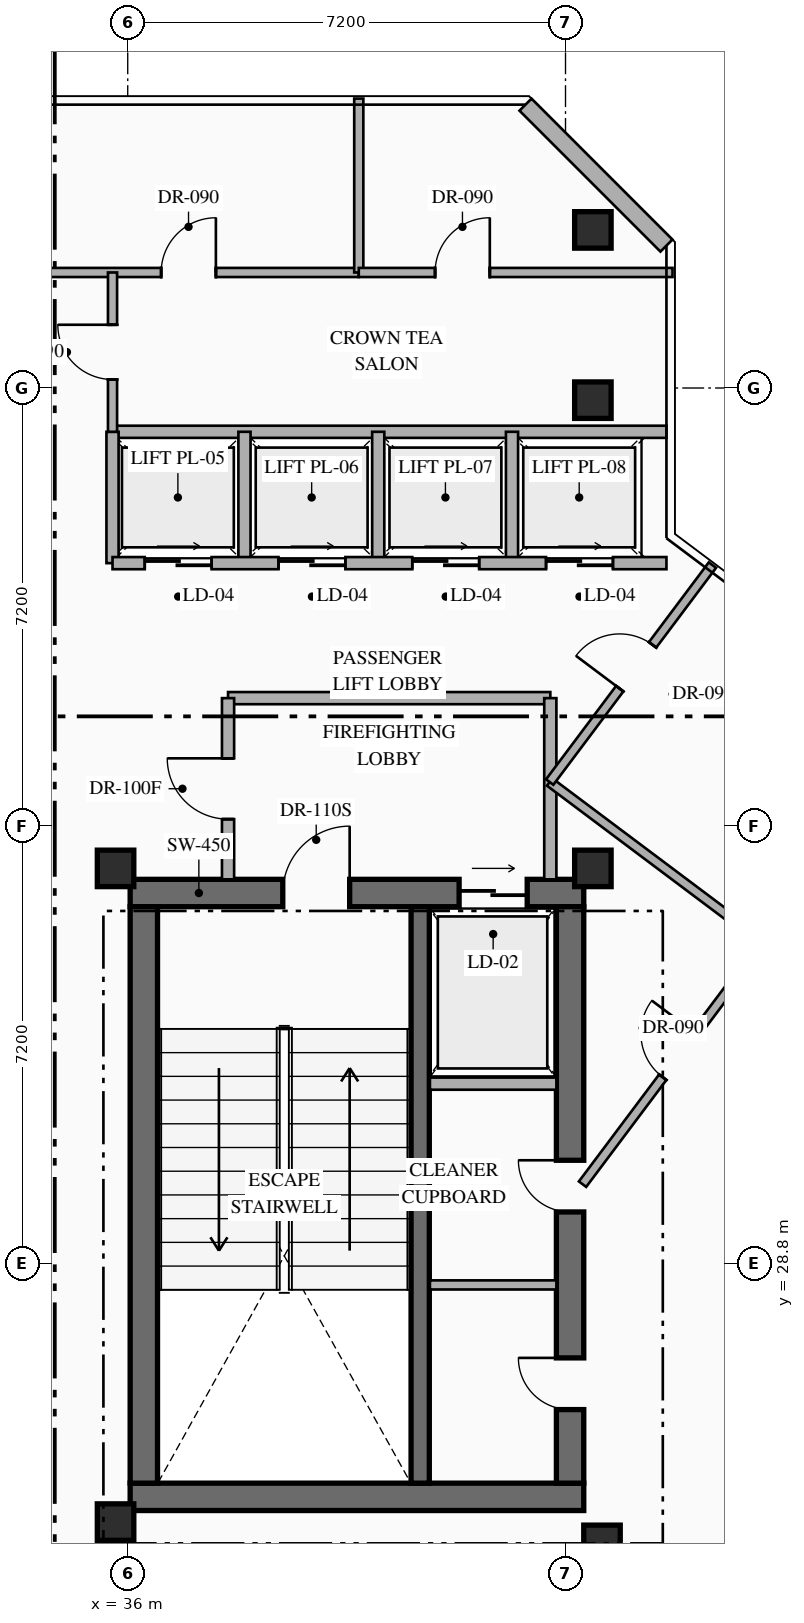
"""IFC4 building model, lengths in metres.
Left out: names, types, materials, properties, quantities, classifications, styles, units other than length and angle.
Written with IfcOpenShell. Run it as: python <this file> out.ifc"""

import sys

from ifc_helpers import new_model, si_unit, direction, frame, frame_2d, origin, origin_2d, place, context, subcontext, project, spatial, rectangle, hollow_rectangle, extrude, element, fill, save


model = new_model("IFC4")
c1 = context("Model", 3, precision=1e-05, world=origin(), true_north=direction((0.0, 1.0)))
c2 = subcontext(c1, "Body", "Model", "MODEL_VIEW")
j1 = project(units=[si_unit("LENGTHUNIT", "METRE"), si_unit("PLANEANGLEUNIT", "RADIAN")], contexts=[c1])
p1 = place(None, origin())
s1 = spatial("IfcSite", under=j1, at=p1, CompositionType="ELEMENT")
p2 = place(p1, origin())
s2 = spatial("IfcBuilding", under=s1, at=p2, CompositionType="ELEMENT")
p3 = place(p2, frame((0.0, 0.0, 269.95)))
s3 = spatial("IfcBuildingStorey", under=s2, at=p3, CompositionType="ELEMENT", Elevation=269.95)
p4 = place(p3, frame((36.04, 24.965, 0.0), z_axis=(0.0, 0.0, 1.0), x_axis=(1.0, 0.0, 0.0)))
e1 = element("IfcWall", 1, at=p4, inside=s3, PredefinedType="SHEAR", context=c2, shape_type="SweptSolid", body=[
    extrude(rectangle(XDim=7.46, YDim=0.45, at=frame_2d((3.73, 0.0))), origin(), (0.0, 0.0, 1.0), 4.0),
])
p5 = place(p3, frame((36.04, 34.895, 0.0), z_axis=(0.0, 0.0, 1.0), x_axis=(1.0, 0.0, 0.0)))
e2 = element("IfcWall", 2, at=p5, inside=s3, PredefinedType="SHEAR", context=c2, shape_type="SweptSolid", body=[
    extrude(rectangle(XDim=7.46, YDim=0.45, at=frame_2d((3.73, 0.0))), origin(), (0.0, 0.0, 1.0), 4.0),
])
p6 = place(p5, frame((2.51, 0.0, 0.0)))
e3 = element("IfcOpeningElement", 3, at=p6, cuts=e2, PredefinedType="OPENING", context=c2, shape_type="SweptSolid", body=[
    extrude(rectangle(XDim=1.1, YDim=2.2, at=frame_2d((0.55, 1.1))), frame((0.0, 0.235, 0.0), z_axis=(0.0, -1.0, 0.0), x_axis=(1.0, 0.0, 0.0)), (0.0, 0.0, 1.0), 0.47),
])
p7 = place(p5, frame((5.41, 0.0, 0.0)))
e4 = element("IfcOpeningElement", 4, at=p7, cuts=e2, PredefinedType="OPENING", context=c2, shape_type="SweptSolid", body=[
    extrude(rectangle(XDim=1.12, YDim=2.15, at=frame_2d((0.56, 1.075))), frame((0.0, 0.235, 0.0), z_axis=(0.0, -1.0, 0.0), x_axis=(1.0, 0.0, 0.0)), (0.0, 0.0, 1.0), 0.47),
])
p8 = place(p3, frame((36.265, 25.19, 0.0), z_axis=(0.0, 0.0, 1.0), x_axis=(0.0, 1.0, 0.0)))
e5 = element("IfcWall", 5, at=p8, inside=s3, PredefinedType="SHEAR", context=c2, shape_type="SweptSolid", body=[
    extrude(rectangle(XDim=9.48, YDim=0.45, at=frame_2d((4.74, 0.0))), origin(), (0.0, 0.0, 1.0), 4.0),
])
p9 = place(p3, frame((43.275, 25.19, 0.0), z_axis=(0.0, 0.0, 1.0), x_axis=(0.0, 1.0, 0.0)))
e6 = element("IfcWall", 6, at=p9, inside=s3, PredefinedType="SHEAR", context=c2, shape_type="SweptSolid", body=[
    extrude(rectangle(XDim=9.48, YDim=0.45, at=frame_2d((4.74, 0.0))), origin(), (0.0, 0.0, 1.0), 4.0),
])
p10 = place(p9, frame((1.21, 0.0, 0.0)))
e7 = element("IfcOpeningElement", 7, at=p10, cuts=e6, PredefinedType="OPENING", context=c2, shape_type="SweptSolid", body=[
    extrude(rectangle(XDim=0.85, YDim=2.08, at=frame_2d((0.425, 1.04))), frame((0.0, 0.235, 0.0), z_axis=(0.0, -1.0, 0.0), x_axis=(1.0, 0.0, 0.0)), (0.0, 0.0, 1.0), 0.47),
])
p11 = place(p9, frame((4.46, 0.0, 0.0)))
e8 = element("IfcOpeningElement", 8, at=p11, cuts=e6, PredefinedType="OPENING", context=c2, shape_type="SweptSolid", body=[
    extrude(rectangle(XDim=0.85, YDim=2.08, at=frame_2d((0.425, 1.04))), frame((0.0, 0.235, 0.0), z_axis=(0.0, -1.0, 0.0), x_axis=(1.0, 0.0, 0.0)), (0.0, 0.0, 1.0), 0.47),
])
p12 = place(p3, frame((40.81, 25.19, 0.0), z_axis=(0.0, 0.0, 1.0), x_axis=(0.0, 1.0, 0.0)))
e9 = element("IfcWall", 9, at=p12, inside=s3, PredefinedType="SHEAR", context=c2, shape_type="SweptSolid", body=[
    extrude(rectangle(XDim=9.48, YDim=0.3, at=frame_2d((4.74, 0.0))), origin(), (0.0, 0.0, 1.0), 4.0),
])
for number, where, z_axis, x_axis in (
    (10, (35.8, 24.55, 0.0), (0.0, 0.0, 1.0), (1.0, 0.0, 0.0)),
    (11, (43.8, 24.2, 0.0), (0.0, 0.0, 1.0), (1.0, 0.0, 0.0)),
    (12, (35.8, 35.3, 0.0), (0.0, 0.0, 1.0), (1.0, 0.0, 0.0)),
    (13, (43.65, 35.3, 0.0), (0.0, 0.0, 1.0), (1.0, 0.0, 0.0)),
    (14, (43.65, 43.0, 0.0), (0.0, 0.0, 1.0), (1.0, 0.0, 0.0)),
    (15, (43.65, 45.8, 0.0), (0.0, 0.0, 1.0), (1.0, 0.0, 0.0)),
):
    element("IfcColumn", number, at=place(p3, frame(where, z_axis=z_axis, x_axis=x_axis)), inside=s3, PredefinedType="COLUMN", context=c2, shape_type="SweptSolid", body=[
        extrude(hollow_rectangle(XDim=0.6, YDim=0.6, WallThickness=0.025, at=origin_2d()), origin(), (0.0, 0.0, 1.0), 4.0),
    ])
p13 = place(p3, frame((42.542, 47.86, 0.0), z_axis=(0.0, 0.0, 1.0), x_axis=(0.707106781187, -0.707106781187, 0.0)))
e16 = element("IfcWall", 16, at=p13, inside=s3, PredefinedType="STANDARD", context=c2, shape_type="SweptSolid", body=[
    extrude(rectangle(XDim=3.278, YDim=0.28, at=frame_2d((1.639, 0.0))), origin(), (0.0, 0.0, 1.0), 3.74),
])
p14 = place(p3, frame((40.97, 31.76, 0.0), z_axis=(0.0, 0.0, 1.0), x_axis=(1.0, 0.0, 0.0)))
e17 = element("IfcWall", 17, at=p14, inside=s3, PredefinedType="STANDARD", context=c2, shape_type="SweptSolid", body=[
    extrude(rectangle(XDim=2.08, YDim=0.2, at=frame_2d((1.04, 0.0))), origin(), (0.0, 0.0, 1.0), 3.74),
])
p15 = place(p3, frame((40.97, 28.45, 0.0), z_axis=(0.0, 0.0, 1.0), x_axis=(1.0, 0.0, 0.0)))
e18 = element("IfcWall", 18, at=p15, inside=s3, PredefinedType="PARTITIONING", context=c2, shape_type="SweptSolid", body=[
    extrude(rectangle(XDim=2.08, YDim=0.15, at=frame_2d((1.04, 0.0))), origin(), (0.0, 0.0, 1.0), 3.74),
])
p16 = place(p3, frame((37.65, 38.1, 0.0), z_axis=(0.0, 0.0, 1.0), x_axis=(1.0, 0.0, 0.0)))
e19 = element("IfcWall", 19, at=p16, inside=s3, PredefinedType="STANDARD", context=c2, shape_type="SweptSolid", body=[
    extrude(rectangle(XDim=5.3, YDim=0.2, at=frame_2d((2.65, 0.0))), origin(), (0.0, 0.0, 1.0), 3.74),
])
p17 = place(p3, frame((42.95, 35.12, 0.0), z_axis=(0.0, 0.0, 1.0), x_axis=(0.0, 1.0, 0.0)))
e20 = element("IfcWall", 20, at=p17, inside=s3, PredefinedType="STANDARD", context=c2, shape_type="SweptSolid", body=[
    extrude(rectangle(XDim=2.98, YDim=0.2, at=frame_2d((1.49, 0.0))), origin(), (0.0, 0.0, 1.0), 3.74),
])
p18 = place(p3, frame((37.65, 35.12, 0.0), z_axis=(0.0, 0.0, 1.0), x_axis=(0.0, 1.0, 0.0)))
e21 = element("IfcWall", 21, at=p18, inside=s3, PredefinedType="STANDARD", context=c2, shape_type="SweptSolid", body=[
    extrude(rectangle(XDim=2.98, YDim=0.2, at=frame_2d((1.49, 0.0))), origin(), (0.0, 0.0, 1.0), 3.74),
])
p19 = place(p18, frame((0.99, 0.0, 0.0)))
e22 = element("IfcOpeningElement", 22, at=p19, cuts=e21, PredefinedType="OPENING", context=c2, shape_type="SweptSolid", body=[
    extrude(rectangle(XDim=1.0, YDim=2.2, at=frame_2d((0.5, 1.1))), frame((0.0, 0.11, 0.0), z_axis=(0.0, -1.0, 0.0), x_axis=(1.0, 0.0, 0.0)), (0.0, 0.0, 1.0), 0.22),
])
p20 = place(p3, frame((35.75, 42.48, 0.0), z_axis=(0.0, 0.0, 1.0), x_axis=(1.0, 0.0, 0.0)))
e23 = element("IfcWall", 23, at=p20, inside=s3, PredefinedType="STANDARD", context=c2, shape_type="SweptSolid", body=[
    extrude(rectangle(XDim=9.11, YDim=0.2, at=frame_2d((4.555, 0.0))), origin(), (0.0, 0.0, 1.0), 3.74),
])
for number, where, z_axis, x_axis in (
    (24, (35.75, 40.32, 0.0), (0.0, 0.0, 1.0), (0.0, 1.0, 0.0)),
    (25, (37.92, 40.32, 0.0), (0.0, 0.0, 1.0), (0.0, 1.0, 0.0)),
    (26, (40.12, 40.32, 0.0), (0.0, 0.0, 1.0), (0.0, 1.0, 0.0)),
    (27, (42.32, 40.32, 0.0), (0.0, 0.0, 1.0), (0.0, 1.0, 0.0)),
):
    element("IfcWall", number, at=place(p3, frame(where, z_axis=z_axis, x_axis=x_axis)), inside=s3, PredefinedType="STANDARD", context=c2, shape_type="SweptSolid", body=[
        extrude(rectangle(XDim=2.16, YDim=0.2, at=frame_2d((1.08, 0.0))), origin(), (0.0, 0.0, 1.0), 3.74),
    ])
p21 = place(p3, frame((35.75, 40.32, 0.0), z_axis=(0.0, 0.0, 1.0), x_axis=(1.0, 0.0, 0.0)))
e28 = element("IfcWall", 28, at=p21, inside=s3, PredefinedType="STANDARD", context=c2, shape_type="SweptSolid", body=[
    extrude(rectangle(XDim=9.11, YDim=0.2, at=frame_2d((4.555, 0.0))), origin(), (0.0, 0.0, 1.0), 3.74),
])
p22 = place(p21, frame((0.53, 0.0, 0.0)))
e29 = element("IfcOpeningElement", 29, at=p22, cuts=e28, PredefinedType="OPENING", context=c2, shape_type="SweptSolid", body=[
    extrude(rectangle(XDim=1.1, YDim=2.18, at=frame_2d((0.55, 1.09))), frame((0.0, 0.11, 0.0), z_axis=(0.0, -1.0, 0.0), x_axis=(1.0, 0.0, 0.0)), (0.0, 0.0, 1.0), 0.22),
])
p23 = place(p21, frame((2.73, 0.0, 0.0)))
e30 = element("IfcOpeningElement", 30, at=p23, cuts=e28, PredefinedType="OPENING", context=c2, shape_type="SweptSolid", body=[
    extrude(rectangle(XDim=1.1, YDim=2.18, at=frame_2d((0.55, 1.09))), frame((0.0, 0.11, 0.0), z_axis=(0.0, -1.0, 0.0), x_axis=(1.0, 0.0, 0.0)), (0.0, 0.0, 1.0), 0.22),
])
p24 = place(p21, frame((4.93, 0.0, 0.0)))
e31 = element("IfcOpeningElement", 31, at=p24, cuts=e28, PredefinedType="OPENING", context=c2, shape_type="SweptSolid", body=[
    extrude(rectangle(XDim=1.1, YDim=2.18, at=frame_2d((0.55, 1.09))), frame((0.0, 0.11, 0.0), z_axis=(0.0, -1.0, 0.0), x_axis=(1.0, 0.0, 0.0)), (0.0, 0.0, 1.0), 0.22),
])
p25 = place(p21, frame((7.13, 0.0, 0.0)))
e32 = element("IfcOpeningElement", 32, at=p25, cuts=e28, PredefinedType="OPENING", context=c2, shape_type="SweptSolid", body=[
    extrude(rectangle(XDim=1.1, YDim=2.18, at=frame_2d((0.55, 1.09))), frame((0.0, 0.11, 0.0), z_axis=(0.0, -1.0, 0.0), x_axis=(1.0, 0.0, 0.0)), (0.0, 0.0, 1.0), 0.22),
])
p26 = place(p3, frame((34.2, 45.1, 0.0), z_axis=(0.0, 0.0, 1.0), x_axis=(1.0, 0.0, 0.0)))
e33 = element("IfcWall", 33, at=p26, inside=s3, PredefinedType="PARTITIONING", context=c2, shape_type="SweptSolid", body=[
    extrude(rectangle(XDim=5.6, YDim=0.15, at=frame_2d((2.8, 0.0))), origin(), (0.0, 0.0, 1.0), 3.74),
])
p27 = place(p26, frame((2.35, 0.0, 0.0)))
e34 = element("IfcOpeningElement", 34, at=p27, cuts=e33, PredefinedType="OPENING", context=c2, shape_type="SweptSolid", body=[
    extrude(rectangle(XDim=0.9, YDim=2.15, at=frame_2d((0.45, 1.075))), frame((0.0, 0.085, 0.0), z_axis=(0.0, -1.0, 0.0), x_axis=(1.0, 0.0, 0.0)), (0.0, 0.0, 1.0), 0.17),
])
p28 = place(p3, frame((39.8, 45.1, 0.0), z_axis=(0.0, 0.0, 1.0), x_axis=(0.0, 1.0, 0.0)))
e35 = element("IfcWall", 35, at=p28, inside=s3, PredefinedType="PARTITIONING", context=c2, shape_type="SweptSolid", body=[
    extrude(rectangle(XDim=2.86, YDim=0.15, at=frame_2d((1.43, 0.0))), origin(), (0.0, 0.0, 1.0), 3.74),
])
p29 = place(p3, frame((39.8, 45.1, 0.0), z_axis=(0.0, 0.0, 1.0), x_axis=(1.0, 0.0, 0.0)))
e36 = element("IfcWall", 36, at=p29, inside=s3, PredefinedType="PARTITIONING", context=c2, shape_type="SweptSolid", body=[
    extrude(rectangle(XDim=5.16, YDim=0.15, at=frame_2d((2.58, 0.0))), origin(), (0.0, 0.0, 1.0), 3.74),
])
p30 = place(p29, frame((1.255, 0.0, 0.0)))
e37 = element("IfcOpeningElement", 37, at=p30, cuts=e36, PredefinedType="OPENING", context=c2, shape_type="SweptSolid", body=[
    extrude(rectangle(XDim=0.9, YDim=2.15, at=frame_2d((0.45, 1.075))), frame((0.0, 0.085, 0.0), z_axis=(0.0, -1.0, 0.0), x_axis=(1.0, 0.0, 0.0)), (0.0, 0.0, 1.0), 0.17),
])
p31 = place(p3, frame((35.75, 42.48, 0.0), z_axis=(0.0, 0.0, 1.0), x_axis=(0.0, 1.0, 0.0)))
e38 = element("IfcWall", 38, at=p31, inside=s3, PredefinedType="PARTITIONING", context=c2, shape_type="SweptSolid", body=[
    extrude(rectangle(XDim=2.62, YDim=0.15, at=frame_2d((1.31, 0.0))), origin(), (0.0, 0.0, 1.0), 3.74),
])
p32 = place(p31, frame((0.86, 0.0, 0.0)))
e39 = element("IfcOpeningElement", 39, at=p32, cuts=e38, PredefinedType="OPENING", context=c2, shape_type="SweptSolid", body=[
    extrude(rectangle(XDim=0.9, YDim=2.15, at=frame_2d((0.45, 1.075))), frame((0.0, 0.085, 0.0), z_axis=(0.0, -1.0, 0.0), x_axis=(1.0, 0.0, 0.0)), (0.0, 0.0, 1.0), 0.17),
])
p33 = place(p3, frame((28.18, 27.04, 0.0), z_axis=(0.0, 0.0, 1.0), x_axis=(0.8, -0.6, 0.0)))
e40 = element("IfcWall", 40, at=p33, inside=s3, PredefinedType="PARTITIONING", context=c2, shape_type="SweptSolid", body=[
    extrude(rectangle(XDim=17.76, YDim=0.15, at=frame_2d((8.88, 0.0))), origin(), (0.0, 0.0, 1.0), 3.74),
])
p34 = place(p33, frame((11.65, 0.0, 0.0)))
e41 = element("IfcOpeningElement", 41, at=p34, cuts=e40, PredefinedType="OPENING", context=c2, shape_type="SweptSolid", body=[
    extrude(rectangle(XDim=0.9, YDim=2.15, at=frame_2d((0.45, 1.075))), frame((0.0, 0.085, 0.0), z_axis=(0.0, -1.0, 0.0), x_axis=(1.0, 0.0, 0.0)), (0.0, 0.0, 1.0), 0.17),
])
p35 = place(p3, frame((43.48, 30.107, 0.0), z_axis=(0.0, 0.0, 1.0), x_axis=(0.600015730265, 0.799988202059, 0.0)))
e42 = element("IfcWall", 42, at=p35, inside=s3, PredefinedType="PARTITIONING", context=c2, shape_type="SweptSolid", body=[
    extrude(rectangle(XDim=4.967, YDim=0.15, at=frame_2d((2.483, 0.0))), origin(), (0.0, 0.0, 1.0), 3.74),
])
p36 = place(p35, frame((2.199, 0.0, 0.0)))
e43 = element("IfcOpeningElement", 43, at=p36, cuts=e42, PredefinedType="OPENING", context=c2, shape_type="SweptSolid", body=[
    extrude(rectangle(XDim=0.9, YDim=2.15, at=frame_2d((0.45, 1.075))), frame((0.0, 0.085, 0.0), z_axis=(0.0, -1.0, 0.0), x_axis=(1.0, 0.0, 0.0)), (0.0, 0.0, 1.0), 0.17),
])
p37 = place(p3, frame((42.94, 36.72, 0.0), z_axis=(0.0, 0.0, 1.0), x_axis=(0.800013316712, -0.599982243973, 0.0)))
e44 = element("IfcWall", 44, at=p37, inside=s3, PredefinedType="PARTITIONING", context=c2, shape_type="SweptSolid", body=[
    extrude(rectangle(XDim=4.4, YDim=0.15, at=frame_2d((2.2, 0.0))), origin(), (0.0, 0.0, 1.0), 3.295),
])
p38 = place(p3, frame((42.94, 36.72, 0.0), z_axis=(0.0, 0.0, 1.0), x_axis=(0.599991241767, 0.8000065686, 0.0)))
e45 = element("IfcWall", 45, at=p38, inside=s3, PredefinedType="PARTITIONING", context=c2, shape_type="SweptSolid", body=[
    extrude(rectangle(XDim=4.46, YDim=0.15, at=frame_2d((2.23, 0.0))), origin(), (0.0, 0.0, 1.0), 3.74),
])
p39 = place(p38, frame((1.92, 0.0, 0.0)))
e46 = element("IfcOpeningElement", 46, at=p39, cuts=e45, PredefinedType="OPENING", context=c2, shape_type="SweptSolid", body=[
    extrude(rectangle(XDim=0.9, YDim=2.15, at=frame_2d((0.45, 1.075))), frame((0.0, 0.085, 0.0), z_axis=(0.0, -1.0, 0.0), x_axis=(1.0, 0.0, 0.0)), (0.0, 0.0, 1.0), 0.17),
])
p40 = place(p6, origin())
e47 = element("IfcDoor", 47, at=p40, inside=s3, OperationType="SINGLE_SWING_RIGHT", PredefinedType="DOOR", context=c2, shape_type="SweptSolid", body=[
    extrude(rectangle(XDim=1.1, YDim=2.2, at=frame_2d((0.55, 1.1))), frame((0.0, 0.025, 0.0), z_axis=(0.0, -1.0, 0.0), x_axis=(1.0, 0.0, 0.0)), (0.0, 0.0, 1.0), 0.05),
])
fill(e3, e47)
p41 = place(p7, origin())
e48 = element("IfcDoor", 48, at=p41, inside=s3, OperationType="SLIDING_TO_RIGHT", PredefinedType="USERDEFINED", context=c2, shape_type="SweptSolid", body=[
    extrude(rectangle(XDim=1.12, YDim=2.15, at=frame_2d((0.56, 1.075))), frame((0.0, 0.025, 0.0), z_axis=(0.0, -1.0, 0.0), x_axis=(1.0, 0.0, 0.0)), (0.0, 0.0, 1.0), 0.05),
])
fill(e4, e48)
p42 = place(p10, origin())
e49 = element("IfcDoor", 49, at=p42, inside=s3, OperationType="SINGLE_SWING_RIGHT", PredefinedType="DOOR", context=c2, shape_type="SweptSolid", body=[
    extrude(rectangle(XDim=0.85, YDim=2.08, at=frame_2d((0.425, 1.04))), frame((0.0, 0.025, 0.0), z_axis=(0.0, -1.0, 0.0), x_axis=(1.0, 0.0, 0.0)), (0.0, 0.0, 1.0), 0.05),
])
fill(e7, e49)
p43 = place(p11, origin())
e50 = element("IfcDoor", 50, at=p43, inside=s3, OperationType="SINGLE_SWING_RIGHT", PredefinedType="DOOR", context=c2, shape_type="SweptSolid", body=[
    extrude(rectangle(XDim=0.85, YDim=2.08, at=frame_2d((0.425, 1.04))), frame((0.0, 0.025, 0.0), z_axis=(0.0, -1.0, 0.0), x_axis=(1.0, 0.0, 0.0)), (0.0, 0.0, 1.0), 0.05),
])
fill(e8, e50)
p44 = place(p19, origin())
e51 = element("IfcDoor", 51, at=p44, inside=s3, OperationType="SINGLE_SWING_RIGHT", PredefinedType="DOOR", context=c2, shape_type="SweptSolid", body=[
    extrude(rectangle(XDim=1.0, YDim=2.2, at=frame_2d((0.5, 1.1))), frame((0.0, 0.025, 0.0), z_axis=(0.0, -1.0, 0.0), x_axis=(1.0, 0.0, 0.0)), (0.0, 0.0, 1.0), 0.05),
])
fill(e22, e51)
p45 = place(p22, origin())
e52 = element("IfcDoor", 52, at=p45, inside=s3, OperationType="SLIDING_TO_RIGHT", PredefinedType="USERDEFINED", context=c2, shape_type="SweptSolid", body=[
    extrude(rectangle(XDim=1.1, YDim=2.18, at=frame_2d((0.55, 1.09))), frame((0.0, 0.025, 0.0), z_axis=(0.0, -1.0, 0.0), x_axis=(1.0, 0.0, 0.0)), (0.0, 0.0, 1.0), 0.05),
])
fill(e29, e52)
p46 = place(p23, origin())
e53 = element("IfcDoor", 53, at=p46, inside=s3, OperationType="SLIDING_TO_RIGHT", PredefinedType="USERDEFINED", context=c2, shape_type="SweptSolid", body=[
    extrude(rectangle(XDim=1.1, YDim=2.18, at=frame_2d((0.55, 1.09))), frame((0.0, 0.025, 0.0), z_axis=(0.0, -1.0, 0.0), x_axis=(1.0, 0.0, 0.0)), (0.0, 0.0, 1.0), 0.05),
])
fill(e30, e53)
p47 = place(p24, origin())
e54 = element("IfcDoor", 54, at=p47, inside=s3, OperationType="SLIDING_TO_RIGHT", PredefinedType="USERDEFINED", context=c2, shape_type="SweptSolid", body=[
    extrude(rectangle(XDim=1.1, YDim=2.18, at=frame_2d((0.55, 1.09))), frame((0.0, 0.025, 0.0), z_axis=(0.0, -1.0, 0.0), x_axis=(1.0, 0.0, 0.0)), (0.0, 0.0, 1.0), 0.05),
])
fill(e31, e54)
p48 = place(p25, origin())
e55 = element("IfcDoor", 55, at=p48, inside=s3, OperationType="SLIDING_TO_RIGHT", PredefinedType="USERDEFINED", context=c2, shape_type="SweptSolid", body=[
    extrude(rectangle(XDim=1.1, YDim=2.18, at=frame_2d((0.55, 1.09))), frame((0.0, 0.025, 0.0), z_axis=(0.0, -1.0, 0.0), x_axis=(1.0, 0.0, 0.0)), (0.0, 0.0, 1.0), 0.05),
])
fill(e32, e55)
p49 = place(p27, origin())
e56 = element("IfcDoor", 56, at=p49, inside=s3, OperationType="SINGLE_SWING_RIGHT", PredefinedType="DOOR", context=c2, shape_type="SweptSolid", body=[
    extrude(rectangle(XDim=0.9, YDim=2.15, at=frame_2d((0.45, 1.075))), frame((0.0, 0.025, 0.0), z_axis=(0.0, -1.0, 0.0), x_axis=(1.0, 0.0, 0.0)), (0.0, 0.0, 1.0), 0.05),
])
fill(e34, e56)
p50 = place(p30, origin())
e57 = element("IfcDoor", 57, at=p50, inside=s3, OperationType="SINGLE_SWING_RIGHT", PredefinedType="DOOR", context=c2, shape_type="SweptSolid", body=[
    extrude(rectangle(XDim=0.9, YDim=2.15, at=frame_2d((0.45, 1.075))), frame((0.0, 0.025, 0.0), z_axis=(0.0, -1.0, 0.0), x_axis=(1.0, 0.0, 0.0)), (0.0, 0.0, 1.0), 0.05),
])
fill(e37, e57)
p51 = place(p32, origin())
e58 = element("IfcDoor", 58, at=p51, inside=s3, OperationType="SINGLE_SWING_RIGHT", PredefinedType="DOOR", context=c2, shape_type="SweptSolid", body=[
    extrude(rectangle(XDim=0.9, YDim=2.15, at=frame_2d((0.45, 1.075))), frame((0.0, 0.025, 0.0), z_axis=(0.0, -1.0, 0.0), x_axis=(1.0, 0.0, 0.0)), (0.0, 0.0, 1.0), 0.05),
])
fill(e39, e58)
p52 = place(p36, origin())
e59 = element("IfcDoor", 59, at=p52, inside=s3, OperationType="SINGLE_SWING_RIGHT", PredefinedType="DOOR", context=c2, shape_type="SweptSolid", body=[
    extrude(rectangle(XDim=0.9, YDim=2.15, at=frame_2d((0.45, 1.075))), frame((0.0, 0.025, 0.0), z_axis=(0.0, -1.0, 0.0), x_axis=(1.0, 0.0, 0.0)), (0.0, 0.0, 1.0), 0.05),
])
fill(e43, e59)
p53 = place(p39, origin())
e60 = element("IfcDoor", 60, at=p53, inside=s3, OperationType="SINGLE_SWING_LEFT", PredefinedType="DOOR", context=c2, shape_type="SweptSolid", body=[
    extrude(rectangle(XDim=0.9, YDim=2.15, at=frame_2d((0.45, 1.075))), frame((0.0, 0.025, 0.0), z_axis=(0.0, -1.0, 0.0), x_axis=(1.0, 0.0, 0.0)), (0.0, 0.0, 1.0), 0.05),
])
fill(e46, e60)
save(model, sys.argv[1])
